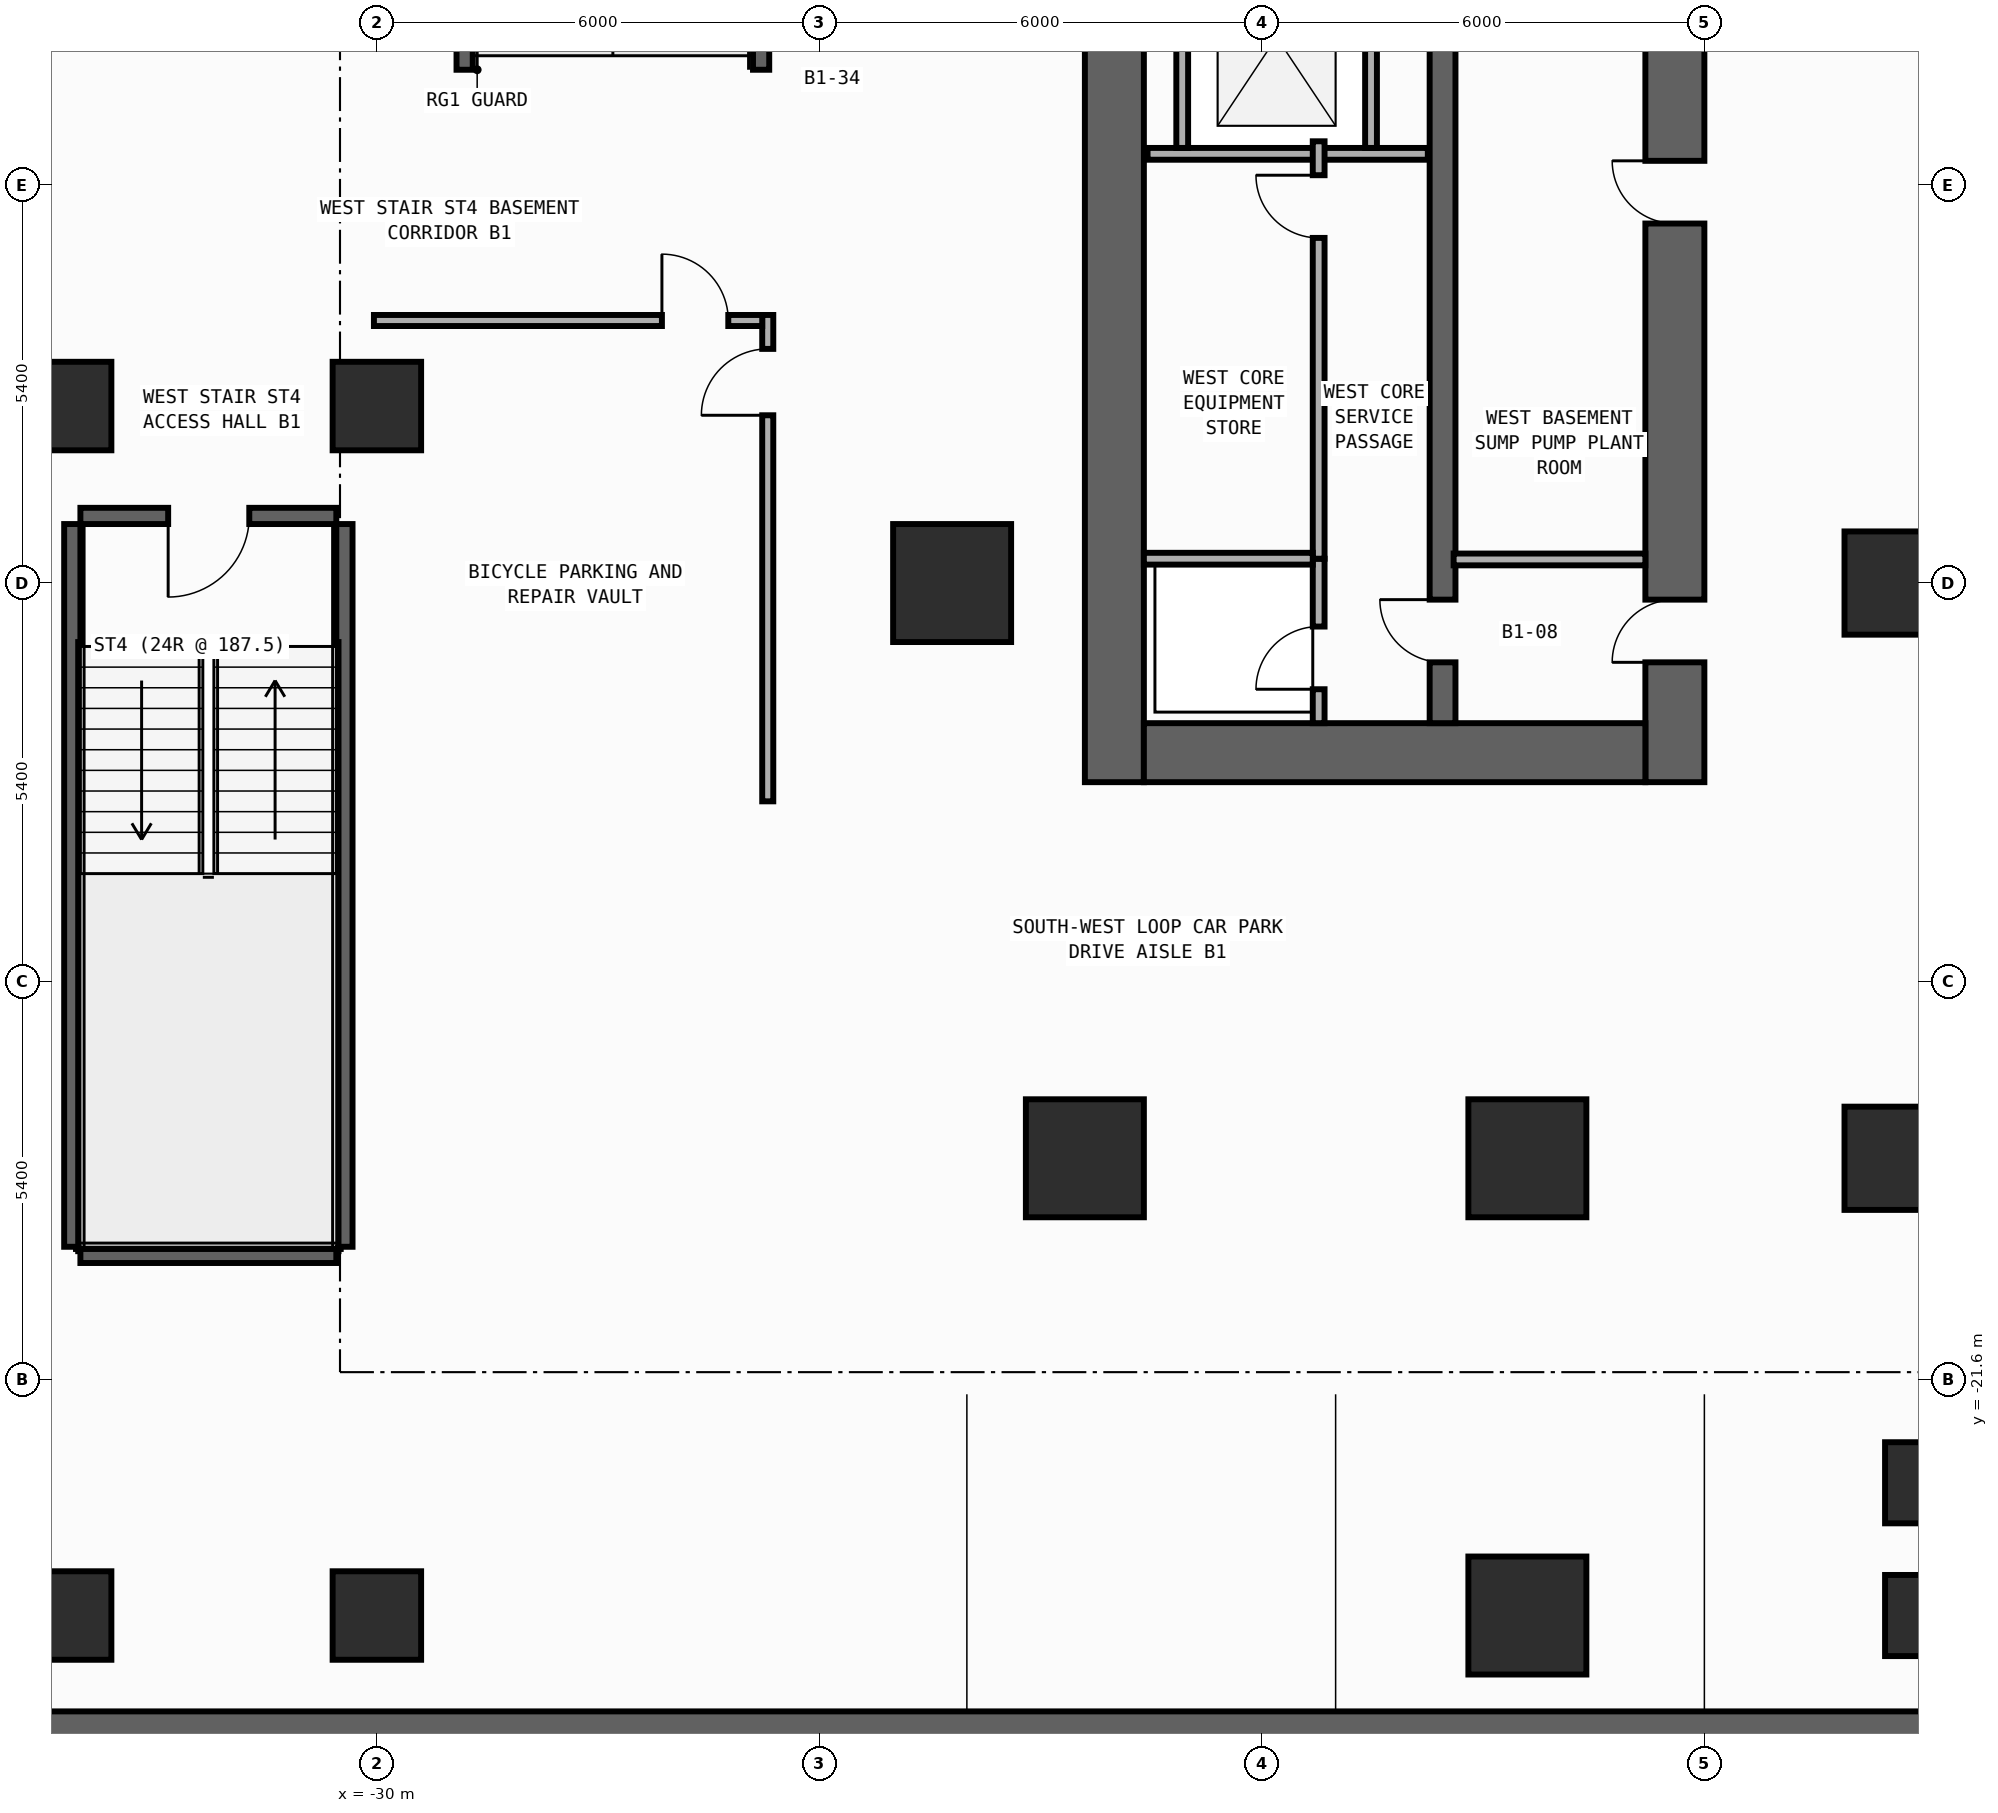
"""IFC4 building model, lengths in metres.
Left out: names, types, materials, properties, quantities, classifications, styles, units other than length and angle.
Written with IfcOpenShell. Run it as: python <this file> out.ifc"""

import sys

from ifc_helpers import new_model, si_unit, direction, frame, frame_2d, origin, origin_2d, place, context, subcontext, project, spatial, polyline, rectangle, outline, extrude, element, fill, save


model = new_model("IFC4")
c1 = context("Model", 3, precision=1e-05, world=origin(), true_north=direction((0.0, 1.0)))
c2 = subcontext(c1, "Body", "Model", "MODEL_VIEW")
j1 = project(units=[si_unit("LENGTHUNIT", "METRE"), si_unit("PLANEANGLEUNIT", "RADIAN")], contexts=[c1])
p1 = place(None, origin())
s1 = spatial("IfcSite", under=j1, at=p1, CompositionType="ELEMENT")
p2 = place(p1, origin())
s2 = spatial("IfcBuilding", under=s1, at=p2, CompositionType="ELEMENT")
p3 = place(p2, frame((0.0, 0.0, -4.5)))
s3 = spatial("IfcBuildingStorey", under=s2, at=p3, CompositionType="ELEMENT", Elevation=-4.5)
p4 = place(p3, frame((-20.0, -13.5, 0.0), z_axis=(0.0, 0.0, 1.0), x_axis=(0.0, 1.0, 0.0)))
e1 = element("IfcWall", 1, at=p4, inside=s3, PredefinedType="SHEAR", context=c2, shape_type="SweptSolid", body=[
    extrude(rectangle(XDim=27.0, YDim=0.8, at=frame_2d((13.5, 0.0))), origin(), (0.0, 0.0, 1.0), 4.2),
])
p5 = place(p3, frame((-12.4, -13.5, 0.0), z_axis=(0.0, 0.0, 1.0), x_axis=(0.0, 1.0, 0.0)))
e2 = element("IfcWall", 2, at=p5, inside=s3, PredefinedType="SHEAR", context=c2, shape_type="SweptSolid", body=[
    extrude(rectangle(XDim=27.0, YDim=0.8, at=frame_2d((13.5, 0.0))), origin(), (0.0, 0.0, 1.0), 4.2),
])
p6 = place(p5, frame((17.575, 0.0, 0.0)))
e3 = element("IfcOpeningElement", 3, at=p6, cuts=e2, PredefinedType="OPENING", context=c2, shape_type="SweptSolid", body=[
    extrude(rectangle(XDim=0.85, YDim=2.1, at=frame_2d((0.425, 1.05))), frame((0.0, 0.41, 0.0), z_axis=(0.0, -1.0, 0.0), x_axis=(1.0, 0.0, 0.0)), (0.0, 0.0, 1.0), 0.82),
])
p7 = place(p5, frame((7.575, 0.0, 0.0)))
e4 = element("IfcOpeningElement", 4, at=p7, cuts=e2, PredefinedType="OPENING", context=c2, shape_type="SweptSolid", body=[
    extrude(rectangle(XDim=0.85, YDim=2.1, at=frame_2d((0.425, 1.05))), frame((0.0, 0.41, 0.0), z_axis=(0.0, -1.0, 0.0), x_axis=(1.0, 0.0, 0.0)), (0.0, 0.0, 1.0), 0.82),
])
p8 = place(p5, frame((12.725, 0.0, 0.0)))
e5 = element("IfcOpeningElement", 5, at=p8, cuts=e2, PredefinedType="OPENING", context=c2, shape_type="SweptSolid", body=[
    extrude(rectangle(XDim=1.15, YDim=2.2, at=frame_2d((0.575, 1.1))), frame((0.0, 0.41, 0.0), z_axis=(0.0, -1.0, 0.0), x_axis=(1.0, 0.0, 0.0)), (0.0, 0.0, 1.0), 0.82),
])
p9 = place(p5, frame((1.625, 0.0, 0.0)))
e6 = element("IfcOpeningElement", 6, at=p9, cuts=e2, PredefinedType="OPENING", context=c2, shape_type="SweptSolid", body=[
    extrude(rectangle(XDim=0.85, YDim=2.1, at=frame_2d((0.425, 1.05))), frame((0.0, 0.41, 0.0), z_axis=(0.0, -1.0, 0.0), x_axis=(1.0, 0.0, 0.0)), (0.0, 0.0, 1.0), 0.82),
])
p10 = place(p3, frame((-19.6, -13.1, 0.0), z_axis=(0.0, 0.0, 1.0), x_axis=(1.0, 0.0, 0.0)))
e7 = element("IfcWall", 7, at=p10, inside=s3, PredefinedType="SHEAR", context=c2, shape_type="SweptSolid", body=[
    extrude(rectangle(XDim=6.8, YDim=0.8, at=frame_2d((3.4, 0.0))), origin(), (0.0, 0.0, 1.0), 4.2),
])
p11 = place(p3, frame((-15.55, -12.7, 0.0), z_axis=(0.0, 0.0, 1.0), x_axis=(0.0, 1.0, 0.0)))
e8 = element("IfcWall", 8, at=p11, inside=s3, PredefinedType="SHEAR", context=c2, shape_type="SweptSolid", body=[
    extrude(rectangle(XDim=25.4, YDim=0.35, at=frame_2d((12.7, 0.0))), origin(), (0.0, 0.0, 1.0), 4.2),
])
p12 = place(p11, frame((11.925, 0.0, 0.0)))
e9 = element("IfcOpeningElement", 9, at=p12, cuts=e8, PredefinedType="OPENING", context=c2, shape_type="SweptSolid", body=[
    extrude(rectangle(XDim=1.15, YDim=2.2, at=frame_2d((0.575, 1.1))), frame((0.0, 0.185, 0.0), z_axis=(0.0, -1.0, 0.0), x_axis=(1.0, 0.0, 0.0)), (0.0, 0.0, 1.0), 0.37),
])
p13 = place(p11, frame((0.825, 0.0, 0.0)))
e10 = element("IfcOpeningElement", 10, at=p13, cuts=e8, PredefinedType="OPENING", context=c2, shape_type="SweptSolid", body=[
    extrude(rectangle(XDim=0.85, YDim=2.1, at=frame_2d((0.425, 1.05))), frame((0.0, 0.185, 0.0), z_axis=(0.0, -1.0, 0.0), x_axis=(1.0, 0.0, 0.0)), (0.0, 0.0, 1.0), 0.37),
])
p14 = place(p3, frame((-30.55, -9.89, 0.0), z_axis=(0.0, 0.0, 1.0), x_axis=(-1.0, 0.0, 0.0)))
e11 = element("IfcWall", 11, at=p14, inside=s3, PredefinedType="SHEAR", context=c2, shape_type="SweptSolid", body=[
    extrude(rectangle(XDim=3.47, YDim=0.22, at=frame_2d((1.735, 0.0))), origin(), (0.0, 0.0, 1.0), 4.2),
])
p15 = place(p14, frame((1.18, 0.0, 0.0)))
e12 = element("IfcOpeningElement", 12, at=p15, cuts=e11, PredefinedType="OPENING", context=c2, shape_type="SweptSolid", body=[
    extrude(rectangle(XDim=1.1, YDim=2.2, at=frame_2d((0.55, 1.1))), frame((0.0, 0.12, 0.0), z_axis=(0.0, -1.0, 0.0), x_axis=(1.0, 0.0, 0.0)), (0.0, 0.0, 1.0), 0.24),
])
p16 = place(p3, frame((-34.02, -19.91, 0.0), z_axis=(0.0, 0.0, 1.0), x_axis=(1.0, 0.0, 0.0)))
e13 = element("IfcWall", 13, at=p16, inside=s3, PredefinedType="SHEAR", context=c2, shape_type="SweptSolid", body=[
    extrude(rectangle(XDim=3.47, YDim=0.22, at=frame_2d((1.735, 0.0))), origin(), (0.0, 0.0, 1.0), 4.2),
])
for number, where, z_axis, x_axis in (
    (14, (-34.13, -19.8, 0.0), (0.0, 0.0, 1.0), (0.0, 1.0, 0.0)),
    (15, (-30.44, -19.8, 0.0), (0.0, 0.0, 1.0), (0.0, 1.0, 0.0)),
):
    element("IfcWall", number, at=place(p3, frame(where, z_axis=z_axis, x_axis=x_axis)), inside=s3, PredefinedType="SHEAR", context=c2, shape_type="SweptSolid", body=[
        extrude(rectangle(XDim=9.8, YDim=0.22, at=frame_2d((4.9, 0.0))), origin(), (0.0, 0.0, 1.0), 4.2),
    ])
p17 = place(p3, frame((-35.1, -26.55, 0.0), z_axis=(0.0, 0.0, 1.0), x_axis=(1.0, 0.0, 0.0)))
e16 = element("IfcWall", 16, at=p17, inside=s3, PredefinedType="SHEAR", context=c2, shape_type="SweptSolid", body=[
    extrude(rectangle(XDim=70.2, YDim=0.9, at=frame_2d((35.1, 0.0))), origin(), (0.0, 0.0, 1.0), 4.2),
])
for number, where, z_axis, x_axis in (
    (17, (-9.2, -18.6, 0.0), (0.0, 0.0, 1.0), (1.0, 0.0, 0.0)),
    (18, (-9.2, -10.8, 0.0), (0.0, 0.0, 1.0), (1.0, 0.0, 0.0)),
):
    element("IfcColumn", number, at=place(p3, frame(where, z_axis=z_axis, x_axis=x_axis)), inside=s3, PredefinedType="COLUMN", context=c2, shape_type="SweptSolid", body=[
        extrude(rectangle(XDim=1.8, YDim=1.4, at=origin_2d()), origin(), (0.0, 0.0, 1.0), 4.5),
    ])
for number, where, z_axis, x_axis in (
    (19, (-20.4, -18.6, 0.0), (0.0, 0.0, 1.0), (1.0, 0.0, 0.0)),
    (20, (-14.4, -18.6, 0.0), (0.0, 0.0, 1.0), (1.0, 0.0, 0.0)),
):
    element("IfcColumn", number, at=place(p3, frame(where, z_axis=z_axis, x_axis=x_axis)), inside=s3, PredefinedType="COLUMN", context=c2, shape_type="SweptSolid", body=[
        extrude(rectangle(XDim=1.6, YDim=1.6, at=origin_2d()), origin(), (0.0, 0.0, 1.0), 4.5),
    ])
for number, where, z_axis, x_axis in (
    (21, (-34.2, -24.8, 0.0), (0.0, 0.0, 1.0), (1.0, 0.0, 0.0)),
    (22, (-34.2, -8.4, 0.0), (0.0, 0.0, 1.0), (1.0, 0.0, 0.0)),
    (23, (-30.0, -24.8, 0.0), (0.0, 0.0, 1.0), (1.0, 0.0, 0.0)),
    (24, (-30.0, -8.4, 0.0), (0.0, 0.0, 1.0), (1.0, 0.0, 0.0)),
):
    element("IfcColumn", number, at=place(p3, frame(where, z_axis=z_axis, x_axis=x_axis)), inside=s3, PredefinedType="COLUMN", context=c2, shape_type="SweptSolid", body=[
        extrude(rectangle(XDim=1.2, YDim=1.2, at=origin_2d()), origin(), (0.0, 0.0, 1.0), 4.5),
    ])
p18 = place(p3, frame((-9.2, -24.8, 0.0), z_axis=(0.0, 0.0, 1.0), x_axis=(1.0, 0.0, 0.0)))
e25 = element("IfcColumn", 25, at=p18, inside=s3, PredefinedType="PILASTER", context=c2, shape_type="SweptSolid", body=[
    extrude(rectangle(XDim=0.7, YDim=1.1, at=origin_2d()), origin(), (0.0, 0.0, 1.0), 4.5),
])
for number, where, z_axis, x_axis in (
    (26, (-22.2, -10.8, 0.0), (0.0, 0.0, 1.0), (1.0, 0.0, 0.0)),
    (27, (-14.4, -24.8, 0.0), (0.0, 0.0, 1.0), (1.0, 0.0, 0.0)),
):
    element("IfcColumn", number, at=place(p3, frame(where, z_axis=z_axis, x_axis=x_axis)), inside=s3, PredefinedType="COLUMN", context=c2, shape_type="SweptSolid", body=[
        extrude(rectangle(XDim=1.6, YDim=1.6, at=origin_2d()), origin(), (0.0, 0.0, 1.0), 4.5),
    ])
p19 = place(p3, frame((-9.2, -23.0, 0.0), z_axis=(0.0, 0.0, 1.0), x_axis=(1.0, 0.0, 0.0)))
e28 = element("IfcColumn", 28, at=p19, inside=s3, PredefinedType="PILASTER", context=c2, shape_type="SweptSolid", body=[
    extrude(rectangle(XDim=0.7, YDim=1.1, at=origin_2d()), origin(), (0.0, 0.0, 1.0), 4.5),
])
for number, where, z_axis, x_axis in (
    (29, (-28.81, -3.84, 0.0), (0.0, 0.0, 1.0), (0.0, 1.0, 0.0)),
    (30, (-24.79, -3.84, 0.0), (0.0, 0.0, 1.0), (0.0, 1.0, 0.0)),
):
    element("IfcWall", number, at=place(p3, frame(where, z_axis=z_axis, x_axis=x_axis)), inside=s3, PredefinedType="SHEAR", context=c2, shape_type="SweptSolid", body=[
        extrude(outline(polyline([(0.0, 0.0), (30.18, 0.0), (30.18, 4.2), (0.0, 0.02), (0.0, 0.0)])), frame((0.0, 0.11, 0.0), z_axis=(0.0, -1.0, 0.0), x_axis=(1.0, 0.0, 0.0)), (0.0, 0.0, 1.0), 0.22),
    ])
p20 = place(p3, frame((-19.55, -4.98, 0.0), z_axis=(0.0, 0.0, 1.0), x_axis=(1.0, 0.0, 0.0)))
e31 = element("IfcWall", 31, at=p20, inside=s3, PredefinedType="STANDARD", context=c2, shape_type="SweptSolid", body=[
    extrude(rectangle(XDim=3.8, YDim=0.16, at=frame_2d((1.9, 0.0))), origin(), (0.0, 0.0, 1.0), 4.2),
])
for number, where, z_axis, x_axis in (
    (32, (-19.08, -4.9, 0.0), (0.0, 0.0, 1.0), (0.0, 1.0, 0.0)),
    (33, (-16.52, -4.9, 0.0), (0.0, 0.0, 1.0), (0.0, 1.0, 0.0)),
):
    element("IfcWall", number, at=place(p3, frame(where, z_axis=z_axis, x_axis=x_axis)), inside=s3, PredefinedType="STANDARD", context=c2, shape_type="SweptSolid", body=[
        extrude(rectangle(XDim=2.96, YDim=0.16, at=frame_2d((1.48, 0.0))), origin(), (0.0, 0.0, 1.0), 4.2),
    ])
p21 = place(p3, frame((-15.4, -10.48, 0.0), z_axis=(0.0, 0.0, 1.0), x_axis=(1.0, 0.0, 0.0)))
e34 = element("IfcWall", 34, at=p21, inside=s3, PredefinedType="STANDARD", context=c2, shape_type="SweptSolid", body=[
    extrude(rectangle(XDim=2.6, YDim=0.16, at=frame_2d((1.3, 0.0))), origin(), (0.0, 0.0, 1.0), 4.2),
])
p22 = place(p3, frame((-17.23, -12.7, 0.0), z_axis=(0.0, 0.0, 1.0), x_axis=(0.0, 1.0, 0.0)))
e35 = element("IfcWall", 35, at=p22, inside=s3, PredefinedType="PARTITIONING", context=c2, shape_type="SweptSolid", body=[
    extrude(rectangle(XDim=2.23, YDim=0.16, at=frame_2d((1.115, 0.0))), origin(), (0.0, 0.0, 1.0), 4.2),
])
p23 = place(p22, frame((0.46, 0.0, 0.0)))
e36 = element("IfcOpeningElement", 36, at=p23, cuts=e35, PredefinedType="OPENING", context=c2, shape_type="SweptSolid", body=[
    extrude(rectangle(XDim=0.85, YDim=2.1, at=frame_2d((0.425, 1.05))), frame((0.0, 0.09, 0.0), z_axis=(0.0, -1.0, 0.0), x_axis=(1.0, 0.0, 0.0)), (0.0, 0.0, 1.0), 0.18),
])
p24 = place(p3, frame((-17.23, -10.47, 0.0), z_axis=(0.0, 0.0, 1.0), x_axis=(0.0, 1.0, 0.0)))
e37 = element("IfcWall", 37, at=p24, inside=s3, PredefinedType="PARTITIONING", context=c2, shape_type="SweptSolid", body=[
    extrude(rectangle(XDim=5.66, YDim=0.16, at=frame_2d((2.83, 0.0))), origin(), (0.0, 0.0, 1.0), 4.2),
])
p25 = place(p24, frame((4.35, 0.0, 0.0)))
e38 = element("IfcOpeningElement", 38, at=p25, cuts=e37, PredefinedType="OPENING", context=c2, shape_type="SweptSolid", body=[
    extrude(rectangle(XDim=0.85, YDim=2.1, at=frame_2d((0.425, 1.05))), frame((0.0, 0.09, 0.0), z_axis=(0.0, -1.0, 0.0), x_axis=(1.0, 0.0, 0.0)), (0.0, 0.0, 1.0), 0.18),
])
p26 = place(p3, frame((-19.6, -10.47, 0.0), z_axis=(0.0, 0.0, 1.0), x_axis=(1.0, 0.0, 0.0)))
e39 = element("IfcWall", 39, at=p26, inside=s3, PredefinedType="PARTITIONING", context=c2, shape_type="SweptSolid", body=[
    extrude(rectangle(XDim=2.29, YDim=0.16, at=frame_2d((1.145, 0.0))), origin(), (0.0, 0.0, 1.0), 4.2),
])
p27 = place(p3, frame((-24.7, -13.76, 0.0), z_axis=(0.0, 0.0, 1.0), x_axis=(0.0, 1.0, 0.0)))
e40 = element("IfcWall", 40, at=p27, inside=s3, PredefinedType="PARTITIONING", context=c2, shape_type="SweptSolid", body=[
    extrude(rectangle(XDim=6.595, YDim=0.15, at=frame_2d((3.297, 0.0))), origin(), (0.0, 0.0, 1.0), 4.2),
])
p28 = place(p27, frame((5.235, 0.0, 0.0)))
e41 = element("IfcOpeningElement", 41, at=p28, cuts=e40, PredefinedType="OPENING", context=c2, shape_type="SweptSolid", body=[
    extrude(rectangle(XDim=0.9, YDim=2.15, at=frame_2d((0.45, 1.075))), frame((0.0, 0.085, 0.0), z_axis=(0.0, -1.0, 0.0), x_axis=(1.0, 0.0, 0.0)), (0.0, 0.0, 1.0), 0.17),
])
p29 = place(p3, frame((-30.04, -7.24, 0.0), z_axis=(0.0, 0.0, 1.0), x_axis=(1.0, 0.0, 0.0)))
e42 = element("IfcWall", 42, at=p29, inside=s3, PredefinedType="PARTITIONING", context=c2, shape_type="SweptSolid", body=[
    extrude(rectangle(XDim=5.265, YDim=0.15, at=frame_2d((2.633, 0.0))), origin(), (0.0, 0.0, 1.0), 4.2),
])
p30 = place(p29, frame((3.905, 0.0, 0.0)))
e43 = element("IfcOpeningElement", 43, at=p30, cuts=e42, PredefinedType="OPENING", context=c2, shape_type="SweptSolid", body=[
    extrude(rectangle(XDim=0.9, YDim=2.15, at=frame_2d((0.45, 1.075))), frame((0.0, 0.085, 0.0), z_axis=(0.0, -1.0, 0.0), x_axis=(1.0, 0.0, 0.0)), (0.0, 0.0, 1.0), 0.17),
])
p31 = place(p15, origin())
e44 = element("IfcDoor", 44, at=p31, inside=s3, OperationType="SINGLE_SWING_RIGHT", PredefinedType="DOOR", context=c2, shape_type="SweptSolid", body=[
    extrude(rectangle(XDim=1.1, YDim=2.2, at=frame_2d((0.55, 1.1))), frame((0.0, 0.025, 0.0), z_axis=(0.0, -1.0, 0.0), x_axis=(1.0, 0.0, 0.0)), (0.0, 0.0, 1.0), 0.05),
])
fill(e12, e44)
p32 = place(p7, origin())
e45 = element("IfcDoor", 45, at=p32, inside=s3, OperationType="SINGLE_SWING_RIGHT", PredefinedType="DOOR", context=c2, shape_type="SweptSolid", body=[
    extrude(rectangle(XDim=0.85, YDim=2.1, at=frame_2d((0.425, 1.05))), frame((0.0, 0.025, 0.0), z_axis=(0.0, -1.0, 0.0), x_axis=(1.0, 0.0, 0.0)), (0.0, 0.0, 1.0), 0.05),
])
fill(e4, e45)
p33 = place(p9, origin())
e46 = element("IfcDoor", 46, at=p33, inside=s3, OperationType="SINGLE_SWING_LEFT", PredefinedType="DOOR", context=c2, shape_type="SweptSolid", body=[
    extrude(rectangle(XDim=0.85, YDim=2.1, at=frame_2d((0.425, 1.05))), frame((0.0, 0.025, 0.0), z_axis=(0.0, -1.0, 0.0), x_axis=(1.0, 0.0, 0.0)), (0.0, 0.0, 1.0), 0.05),
])
fill(e6, e46)
p34 = place(p13, origin())
e47 = element("IfcDoor", 47, at=p34, inside=s3, OperationType="SINGLE_SWING_RIGHT", PredefinedType="DOOR", context=c2, shape_type="SweptSolid", body=[
    extrude(rectangle(XDim=0.85, YDim=2.1, at=frame_2d((0.425, 1.05))), frame((0.0, 0.025, 0.0), z_axis=(0.0, -1.0, 0.0), x_axis=(1.0, 0.0, 0.0)), (0.0, 0.0, 1.0), 0.05),
])
fill(e10, e47)
p35 = place(p23, origin())
e48 = element("IfcDoor", 48, at=p35, inside=s3, OperationType="SINGLE_SWING_LEFT", PredefinedType="DOOR", context=c2, shape_type="SweptSolid", body=[
    extrude(rectangle(XDim=0.85, YDim=2.1, at=frame_2d((0.425, 1.05))), frame((0.0, 0.025, 0.0), z_axis=(0.0, -1.0, 0.0), x_axis=(1.0, 0.0, 0.0)), (0.0, 0.0, 1.0), 0.05),
])
fill(e36, e48)
p36 = place(p25, origin())
e49 = element("IfcDoor", 49, at=p36, inside=s3, OperationType="SINGLE_SWING_RIGHT", PredefinedType="DOOR", context=c2, shape_type="SweptSolid", body=[
    extrude(rectangle(XDim=0.85, YDim=2.1, at=frame_2d((0.425, 1.05))), frame((0.0, 0.025, 0.0), z_axis=(0.0, -1.0, 0.0), x_axis=(1.0, 0.0, 0.0)), (0.0, 0.0, 1.0), 0.05),
])
fill(e38, e49)
p37 = place(p28, origin())
e50 = element("IfcDoor", 50, at=p37, inside=s3, OperationType="SINGLE_SWING_LEFT", PredefinedType="DOOR", context=c2, shape_type="SweptSolid", body=[
    extrude(rectangle(XDim=0.9, YDim=2.15, at=frame_2d((0.45, 1.075))), frame((0.0, 0.025, 0.0), z_axis=(0.0, -1.0, 0.0), x_axis=(1.0, 0.0, 0.0)), (0.0, 0.0, 1.0), 0.05),
])
fill(e41, e50)
p38 = place(p30, origin())
e51 = element("IfcDoor", 51, at=p38, inside=s3, OperationType="SINGLE_SWING_LEFT", PredefinedType="DOOR", context=c2, shape_type="SweptSolid", body=[
    extrude(rectangle(XDim=0.9, YDim=2.15, at=frame_2d((0.45, 1.075))), frame((0.0, 0.025, 0.0), z_axis=(0.0, -1.0, 0.0), x_axis=(1.0, 0.0, 0.0)), (0.0, 0.0, 1.0), 0.05),
])
fill(e43, e51)
save(model, sys.argv[1])
